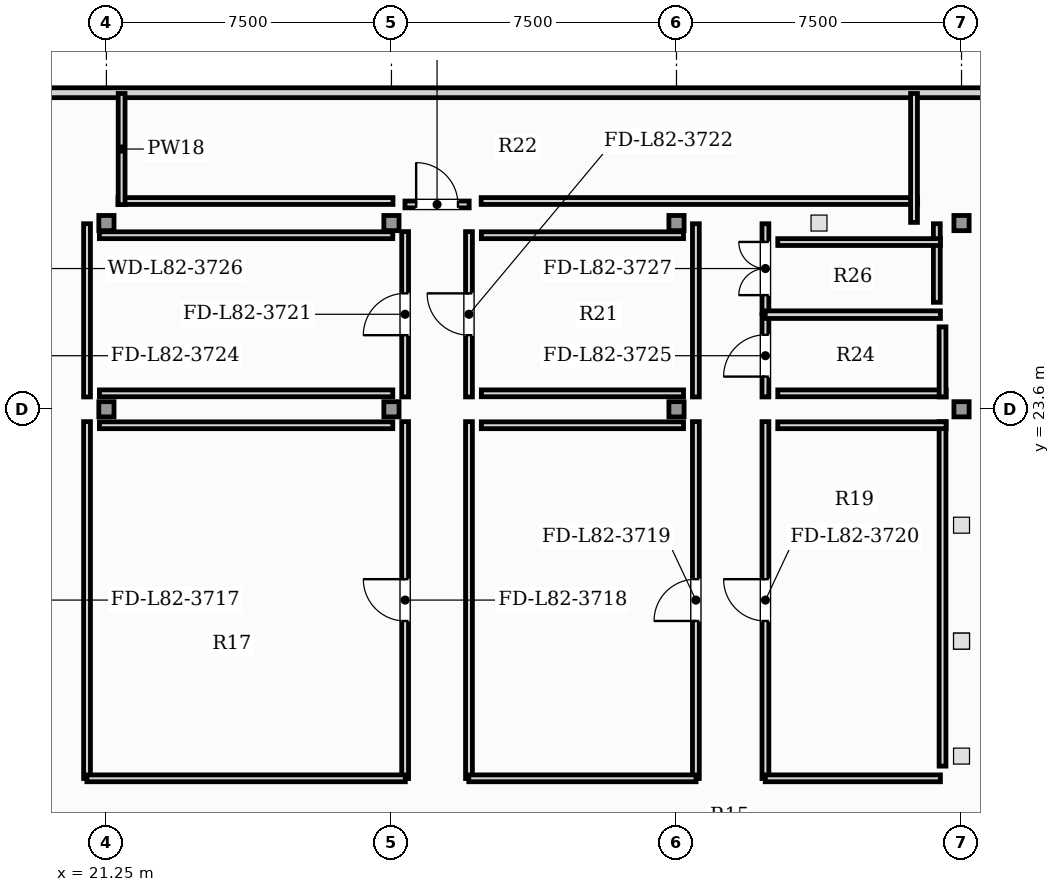
"""IFC4 building model, lengths in metres.
Left out: names, types, materials, properties, quantities, classifications, styles, units other than length and angle.
Written with IfcOpenShell. Run it as: python <this file> out.ifc"""

import sys

from ifc_helpers import new_model, si_unit, direction, frame, frame_2d, origin, origin_2d, place, context, subcontext, project, spatial, rectangle, hollow_rectangle, extrude, element, fill, save


model = new_model("IFC4")
c1 = context("Model", 3, precision=1e-05, world=origin(), true_north=direction((0.0, 1.0)))
c2 = subcontext(c1, "Body", "Model", "MODEL_VIEW")
j1 = project(units=[si_unit("LENGTHUNIT", "METRE"), si_unit("PLANEANGLEUNIT", "RADIAN")], contexts=[c1])
p1 = place(None, origin())
s1 = spatial("IfcSite", under=j1, at=p1, CompositionType="ELEMENT")
p2 = place(p1, origin())
s2 = spatial("IfcBuilding", under=s1, at=p2, CompositionType="ELEMENT")
p3 = place(p2, frame((0.0, 0.0, 332.3)))
s3 = spatial("IfcBuildingStorey", under=s2, at=p3, CompositionType="ELEMENT", Elevation=332.3)
p4 = place(p3, frame((21.25, 23.6, 0.0), z_axis=(0.0, 0.0, 1.0), x_axis=(1.0, 0.0, 0.0)))
e1 = element("IfcColumn", 1, at=p4, inside=s3, PredefinedType="COLUMN", context=c2, shape_type="SweptSolid", body=[
    extrude(hollow_rectangle(XDim=0.4, YDim=0.4, WallThickness=0.02, at=origin_2d()), origin(), (0.0, 0.0, 1.0), 5.2),
])
p5 = place(p3, frame((28.75, 23.6, 0.0), z_axis=(0.0, 0.0, 1.0), x_axis=(1.0, 0.0, 0.0)))
e2 = element("IfcColumn", 2, at=p5, inside=s3, PredefinedType="COLUMN", context=c2, shape_type="SweptSolid", body=[
    extrude(hollow_rectangle(XDim=0.4, YDim=0.4, WallThickness=0.02, at=origin_2d()), origin(), (0.0, 0.0, 1.0), 5.15),
])
for number, where, z_axis, x_axis in (
    (3, (36.25, 23.6, 0.0), (0.0, 0.0, 1.0), (1.0, 0.0, 0.0)),
    (4, (43.75, 23.6, 0.0), (0.0, 0.0, 1.0), (1.0, 0.0, 0.0)),
    (5, (21.25, 28.5, 0.0), (0.0, 0.0, 1.0), (1.0, 0.0, 0.0)),
):
    element("IfcColumn", number, at=place(p3, frame(where, z_axis=z_axis, x_axis=x_axis)), inside=s3, PredefinedType="COLUMN", context=c2, shape_type="SweptSolid", body=[
        extrude(hollow_rectangle(XDim=0.4, YDim=0.4, WallThickness=0.02, at=origin_2d()), origin(), (0.0, 0.0, 1.0), 5.2),
    ])
p6 = place(p3, frame((28.75, 28.5, 0.0), z_axis=(0.0, 0.0, 1.0), x_axis=(1.0, 0.0, 0.0)))
e6 = element("IfcColumn", 6, at=p6, inside=s3, PredefinedType="COLUMN", context=c2, shape_type="SweptSolid", body=[
    extrude(hollow_rectangle(XDim=0.4, YDim=0.4, WallThickness=0.02, at=origin_2d()), origin(), (0.0, 0.0, 1.0), 5.15),
])
for number, where, z_axis, x_axis in (
    (7, (36.25, 28.5, 0.0), (0.0, 0.0, 1.0), (1.0, 0.0, 0.0)),
    (8, (43.75, 28.5, 0.0), (0.0, 0.0, 1.0), (1.0, 0.0, 0.0)),
):
    element("IfcColumn", number, at=place(p3, frame(where, z_axis=z_axis, x_axis=x_axis)), inside=s3, PredefinedType="COLUMN", context=c2, shape_type="SweptSolid", body=[
        extrude(hollow_rectangle(XDim=0.4, YDim=0.4, WallThickness=0.02, at=origin_2d()), origin(), (0.0, 0.0, 1.0), 5.2),
    ])
p7 = place(p3, frame((44.983, 31.929, 0.0), z_axis=(0.0, 0.0, 1.0), x_axis=(-1.0, 0.0, 0.0)))
e9 = element("IfcWall", 9, at=p7, inside=s3, PredefinedType="SOLIDWALL", context=c2, shape_type="SweptSolid", body=[
    extrude(rectangle(XDim=32.465, YDim=0.26, at=frame_2d((16.233, 0.0))), origin(), (0.0, 0.0, 1.0), 4.98),
])
p8 = place(p3, frame((29.11, 13.885, 0.0), z_axis=(0.0, 0.0, 1.0), x_axis=(0.0, 1.0, 0.0)))
e10 = element("IfcWall", 10, at=p8, inside=s3, PredefinedType="PARTITIONING", context=c2, shape_type="SweptSolid", body=[
    extrude(rectangle(XDim=9.39, YDim=0.18, at=frame_2d((4.695, 0.0))), origin(), (0.0, 0.0, 1.0), 4.98),
])
p9 = place(p8, frame((4.145, 0.0, 0.0)))
e11 = element("IfcOpeningElement", 11, at=p9, cuts=e10, PredefinedType="OPENING", context=c2, shape_type="SweptSolid", body=[
    extrude(rectangle(XDim=1.1, YDim=2.2, at=frame_2d((0.55, 1.1))), frame((0.0, 0.1, 0.0), z_axis=(0.0, -1.0, 0.0), x_axis=(1.0, 0.0, 0.0)), (0.0, 0.0, 1.0), 0.2),
])
p10 = place(p3, frame((20.74, 13.885, 0.0), z_axis=(0.0, 0.0, 1.0), x_axis=(0.0, 1.0, 0.0)))
e12 = element("IfcWall", 12, at=p10, inside=s3, PredefinedType="PARTITIONING", context=c2, shape_type="SweptSolid", body=[
    extrude(rectangle(XDim=9.39, YDim=0.18, at=frame_2d((4.695, 0.0))), origin(), (0.0, 0.0, 1.0), 4.98),
])
p11 = place(p3, frame((20.735, 13.89, 0.0), z_axis=(0.0, 0.0, 1.0), x_axis=(1.0, 0.0, 0.0)))
e13 = element("IfcWall", 13, at=p11, inside=s3, PredefinedType="PARTITIONING", context=c2, shape_type="SweptSolid", body=[
    extrude(rectangle(XDim=8.38, YDim=0.18, at=frame_2d((4.19, 0.0))), origin(), (0.0, 0.0, 1.0), 4.98),
])
p12 = place(p3, frame((36.76, 13.885, 0.0), z_axis=(0.0, 0.0, 1.0), x_axis=(0.0, 1.0, 0.0)))
e14 = element("IfcWall", 14, at=p12, inside=s3, PredefinedType="PARTITIONING", context=c2, shape_type="SweptSolid", body=[
    extrude(rectangle(XDim=9.39, YDim=0.18, at=frame_2d((4.695, 0.0))), origin(), (0.0, 0.0, 1.0), 4.98),
])
p13 = place(p12, frame((4.145, 0.0, 0.0)))
e15 = element("IfcOpeningElement", 15, at=p13, cuts=e14, PredefinedType="OPENING", context=c2, shape_type="SweptSolid", body=[
    extrude(rectangle(XDim=1.1, YDim=2.2, at=frame_2d((0.55, 1.1))), frame((0.0, 0.1, 0.0), z_axis=(0.0, -1.0, 0.0), x_axis=(1.0, 0.0, 0.0)), (0.0, 0.0, 1.0), 0.2),
])
p14 = place(p3, frame((30.79, 13.885, 0.0), z_axis=(0.0, 0.0, 1.0), x_axis=(0.0, 1.0, 0.0)))
e16 = element("IfcWall", 16, at=p14, inside=s3, PredefinedType="PARTITIONING", context=c2, shape_type="SweptSolid", body=[
    extrude(rectangle(XDim=9.39, YDim=0.18, at=frame_2d((4.695, 0.0))), origin(), (0.0, 0.0, 1.0), 4.98),
])
p15 = place(p3, frame((30.785, 13.89, 0.0), z_axis=(0.0, 0.0, 1.0), x_axis=(1.0, 0.0, 0.0)))
e17 = element("IfcWall", 17, at=p15, inside=s3, PredefinedType="PARTITIONING", context=c2, shape_type="SweptSolid", body=[
    extrude(rectangle(XDim=5.98, YDim=0.18, at=frame_2d((2.99, 0.0))), origin(), (0.0, 0.0, 1.0), 4.98),
])
p16 = place(p3, frame((38.59, 13.885, 0.0), z_axis=(0.0, 0.0, 1.0), x_axis=(0.0, 1.0, 0.0)))
e18 = element("IfcWall", 18, at=p16, inside=s3, PredefinedType="PARTITIONING", context=c2, shape_type="SweptSolid", body=[
    extrude(rectangle(XDim=9.39, YDim=0.18, at=frame_2d((4.695, 0.0))), origin(), (0.0, 0.0, 1.0), 4.98),
])
p17 = place(p16, frame((4.145, 0.0, 0.0)))
e19 = element("IfcOpeningElement", 19, at=p17, cuts=e18, PredefinedType="OPENING", context=c2, shape_type="SweptSolid", body=[
    extrude(rectangle(XDim=1.1, YDim=2.2, at=frame_2d((0.55, 1.1))), frame((0.0, 0.1, 0.0), z_axis=(0.0, -1.0, 0.0), x_axis=(1.0, 0.0, 0.0)), (0.0, 0.0, 1.0), 0.2),
])
p18 = place(p3, frame((38.585, 13.89, 0.0), z_axis=(0.0, 0.0, 1.0), x_axis=(1.0, 0.0, 0.0)))
e20 = element("IfcWall", 20, at=p18, inside=s3, PredefinedType="PARTITIONING", context=c2, shape_type="SweptSolid", body=[
    extrude(rectangle(XDim=4.61, YDim=0.18, at=frame_2d((2.305, 0.0))), origin(), (0.0, 0.0, 1.0), 4.98),
])
p19 = place(p3, frame((29.11, 23.925, 0.0), z_axis=(0.0, 0.0, 1.0), x_axis=(0.0, 1.0, 0.0)))
e21 = element("IfcWall", 21, at=p19, inside=s3, PredefinedType="PARTITIONING", context=c2, shape_type="SweptSolid", body=[
    extrude(rectangle(XDim=4.35, YDim=0.18, at=frame_2d((2.175, 0.0))), origin(), (0.0, 0.0, 1.0), 4.98),
])
p20 = place(p19, frame((1.625, 0.0, 0.0)))
e22 = element("IfcOpeningElement", 22, at=p20, cuts=e21, PredefinedType="OPENING", context=c2, shape_type="SweptSolid", body=[
    extrude(rectangle(XDim=1.1, YDim=2.2, at=frame_2d((0.55, 1.1))), frame((0.0, 0.1, 0.0), z_axis=(0.0, -1.0, 0.0), x_axis=(1.0, 0.0, 0.0)), (0.0, 0.0, 1.0), 0.2),
])
p21 = place(p3, frame((20.74, 23.925, 0.0), z_axis=(0.0, 0.0, 1.0), x_axis=(0.0, 1.0, 0.0)))
e23 = element("IfcWall", 23, at=p21, inside=s3, PredefinedType="PARTITIONING", context=c2, shape_type="SweptSolid", body=[
    extrude(rectangle(XDim=4.557, YDim=0.18, at=frame_2d((2.278, 0.0))), origin(), (0.0, 0.0, 1.0), 4.98),
])
p22 = place(p3, frame((30.79, 23.925, 0.0), z_axis=(0.0, 0.0, 1.0), x_axis=(0.0, 1.0, 0.0)))
e24 = element("IfcWall", 24, at=p22, inside=s3, PredefinedType="PARTITIONING", context=c2, shape_type="SweptSolid", body=[
    extrude(rectangle(XDim=4.35, YDim=0.18, at=frame_2d((2.175, 0.0))), origin(), (0.0, 0.0, 1.0), 4.98),
])
p23 = place(p22, frame((1.625, 0.0, 0.0)))
e25 = element("IfcOpeningElement", 25, at=p23, cuts=e24, PredefinedType="OPENING", context=c2, shape_type="SweptSolid", body=[
    extrude(rectangle(XDim=1.1, YDim=2.2, at=frame_2d((0.55, 1.1))), frame((0.0, 0.1, 0.0), z_axis=(0.0, -1.0, 0.0), x_axis=(1.0, 0.0, 0.0)), (0.0, 0.0, 1.0), 0.2),
])
p24 = place(p3, frame((36.76, 23.925, 0.0), z_axis=(0.0, 0.0, 1.0), x_axis=(0.0, 1.0, 0.0)))
e26 = element("IfcWall", 26, at=p24, inside=s3, PredefinedType="PARTITIONING", context=c2, shape_type="SweptSolid", body=[
    extrude(rectangle(XDim=4.557, YDim=0.18, at=frame_2d((2.278, 0.0))), origin(), (0.0, 0.0, 1.0), 4.98),
])
p25 = place(p3, frame((29.105, 28.99, 0.0), z_axis=(0.0, 0.0, 1.0), x_axis=(1.0, 0.0, 0.0)))
e27 = element("IfcWall", 27, at=p25, inside=s3, PredefinedType="PARTITIONING", context=c2, shape_type="SweptSolid", body=[
    extrude(rectangle(XDim=1.69, YDim=0.18, at=frame_2d((0.845, 0.0))), origin(), (0.0, 0.0, 1.0), 4.98),
])
p26 = place(p25, frame((0.295, 0.0, 0.0)))
e28 = element("IfcOpeningElement", 28, at=p26, cuts=e27, PredefinedType="OPENING", context=c2, shape_type="SweptSolid", body=[
    extrude(rectangle(XDim=1.1, YDim=2.2, at=frame_2d((0.55, 1.1))), frame((0.0, 0.1, 0.0), z_axis=(0.0, -1.0, 0.0), x_axis=(1.0, 0.0, 0.0)), (0.0, 0.0, 1.0), 0.2),
])
p27 = place(p3, frame((38.59, 23.925, 0.0), z_axis=(0.0, 0.0, 1.0), x_axis=(0.0, 1.0, 0.0)))
e29 = element("IfcWall", 29, at=p27, inside=s3, PredefinedType="PARTITIONING", context=c2, shape_type="SweptSolid", body=[
    extrude(rectangle(XDim=2.17, YDim=0.18, at=frame_2d((1.085, 0.0))), origin(), (0.0, 0.0, 1.0), 4.98),
])
p28 = place(p27, frame((0.535, 0.0, 0.0)))
e30 = element("IfcOpeningElement", 30, at=p28, cuts=e29, PredefinedType="OPENING", context=c2, shape_type="SweptSolid", body=[
    extrude(rectangle(XDim=1.1, YDim=2.2, at=frame_2d((0.55, 1.1))), frame((0.0, 0.1, 0.0), z_axis=(0.0, -1.0, 0.0), x_axis=(1.0, 0.0, 0.0)), (0.0, 0.0, 1.0), 0.2),
])
p29 = place(p3, frame((38.59, 26.125, 0.0), z_axis=(0.0, 0.0, 1.0), x_axis=(0.0, 1.0, 0.0)))
e31 = element("IfcWall", 31, at=p29, inside=s3, PredefinedType="PARTITIONING", context=c2, shape_type="SweptSolid", body=[
    extrude(rectangle(XDim=2.357, YDim=0.18, at=frame_2d((1.178, 0.0))), origin(), (0.0, 0.0, 1.0), 4.98),
])
p30 = place(p29, frame((0.479, 0.0, 0.0)))
e32 = element("IfcOpeningElement", 32, at=p30, cuts=e31, PredefinedType="OPENING", context=c2, shape_type="SweptSolid", body=[
    extrude(rectangle(XDim=1.4, YDim=2.2, at=frame_2d((0.7, 1.1))), frame((0.0, 0.1, 0.0), z_axis=(0.0, -1.0, 0.0), x_axis=(1.0, 0.0, 0.0)), (0.0, 0.0, 1.0), 0.2),
])
p31 = place(p3, frame((38.585, 26.09, 0.0), z_axis=(0.0, 0.0, 1.0), x_axis=(1.0, 0.0, 0.0)))
e33 = element("IfcWall", 33, at=p31, inside=s3, PredefinedType="PARTITIONING", context=c2, shape_type="SweptSolid", body=[
    extrude(rectangle(XDim=4.61, YDim=0.2, at=frame_2d((2.305, 0.0))), origin(), (0.0, 0.0, 1.0), 4.98),
])
p32 = place(p3, frame((28.785, 23.18, 0.0), z_axis=(0.0, 0.0, 1.0), x_axis=(-1.0, 0.0, 0.0)))
e34 = element("IfcWall", 34, at=p32, inside=s3, PredefinedType="PARTITIONING", context=c2, shape_type="SweptSolid", body=[
    extrude(rectangle(XDim=7.72, YDim=0.18, at=frame_2d((3.86, 0.0))), origin(), (0.0, 0.0, 1.0), 4.98),
])
p33 = place(p3, frame((36.435, 23.18, 0.0), z_axis=(0.0, 0.0, 1.0), x_axis=(-1.0, 0.0, 0.0)))
e35 = element("IfcWall", 35, at=p33, inside=s3, PredefinedType="PARTITIONING", context=c2, shape_type="SweptSolid", body=[
    extrude(rectangle(XDim=5.32, YDim=0.18, at=frame_2d((2.66, 0.0))), origin(), (0.0, 0.0, 1.0), 4.98),
])
p34 = place(p3, frame((43.25, 14.211, 0.0), z_axis=(0.0, 0.0, 1.0), x_axis=(0.0, 1.0, 0.0)))
e36 = element("IfcWall", 36, at=p34, inside=s3, PredefinedType="PARTITIONING", context=c2, shape_type="SweptSolid", body=[
    extrude(rectangle(XDim=9.064, YDim=0.18, at=frame_2d((4.532, 0.0))), origin(), (0.0, 0.0, 1.0), 4.98),
])
p35 = place(p3, frame((43.345, 23.18, 0.0), z_axis=(0.0, 0.0, 1.0), x_axis=(-1.0, 0.0, 0.0)))
e37 = element("IfcWall", 37, at=p35, inside=s3, PredefinedType="PARTITIONING", context=c2, shape_type="SweptSolid", body=[
    extrude(rectangle(XDim=4.43, YDim=0.18, at=frame_2d((2.215, 0.0))), origin(), (0.0, 0.0, 1.0), 4.98),
])
for number, where, z_axis, x_axis in (
    (38, (21.065, 24.02, 0.0), (0.0, 0.0, 1.0), (1.0, 0.0, 0.0)),
    (39, (28.785, 28.18, 0.0), (0.0, 0.0, 1.0), (-1.0, 0.0, 0.0)),
):
    element("IfcWall", number, at=place(p3, frame(where, z_axis=z_axis, x_axis=x_axis)), inside=s3, PredefinedType="PARTITIONING", context=c2, shape_type="SweptSolid", body=[
        extrude(rectangle(XDim=7.72, YDim=0.18, at=frame_2d((3.86, 0.0))), origin(), (0.0, 0.0, 1.0), 4.98),
    ])
for number, where, z_axis, x_axis in (
    (40, (31.115, 24.02, 0.0), (0.0, 0.0, 1.0), (1.0, 0.0, 0.0)),
    (41, (36.435, 28.18, 0.0), (0.0, 0.0, 1.0), (-1.0, 0.0, 0.0)),
):
    element("IfcWall", number, at=place(p3, frame(where, z_axis=z_axis, x_axis=x_axis)), inside=s3, PredefinedType="PARTITIONING", context=c2, shape_type="SweptSolid", body=[
        extrude(rectangle(XDim=5.32, YDim=0.18, at=frame_2d((2.66, 0.0))), origin(), (0.0, 0.0, 1.0), 4.98),
    ])
p36 = place(p3, frame((21.555, 29.08, 0.0), z_axis=(0.0, 0.0, 1.0), x_axis=(1.0, 0.0, 0.0)))
e42 = element("IfcWall", 42, at=p36, inside=s3, PredefinedType="PARTITIONING", context=c2, shape_type="SweptSolid", body=[
    extrude(rectangle(XDim=7.235, YDim=0.18, at=frame_2d((3.618, 0.0))), origin(), (0.0, 0.0, 1.0), 4.98),
])
p37 = place(p3, frame((31.11, 29.08, 0.0), z_axis=(0.0, 0.0, 1.0), x_axis=(1.0, 0.0, 0.0)))
e43 = element("IfcWall", 43, at=p37, inside=s3, PredefinedType="PARTITIONING", context=c2, shape_type="SweptSolid", body=[
    extrude(rectangle(XDim=11.485, YDim=0.18, at=frame_2d((5.743, 0.0))), origin(), (0.0, 0.0, 1.0), 4.98),
])
p38 = place(p3, frame((42.5, 28.518, 0.0), z_axis=(0.0, 0.0, 1.0), x_axis=(0.0, 1.0, 0.0)))
e44 = element("IfcWall", 44, at=p38, inside=s3, PredefinedType="PARTITIONING", context=c2, shape_type="SweptSolid", body=[
    extrude(rectangle(XDim=3.392, YDim=0.18, at=frame_2d((1.696, 0.0))), origin(), (0.0, 0.0, 1.0), 4.98),
])
p39 = place(p3, frame((21.65, 31.91, 0.0), z_axis=(0.0, 0.0, 1.0), x_axis=(0.0, -1.0, 0.0)))
e45 = element("IfcWall", 45, at=p39, inside=s3, PredefinedType="PARTITIONING", context=c2, shape_type="SweptSolid", body=[
    extrude(rectangle(XDim=2.925, YDim=0.18, at=frame_2d((1.462, 0.0))), origin(), (0.0, 0.0, 1.0), 4.98),
])
p40 = place(p3, frame((38.915, 24.02, 0.0), z_axis=(0.0, 0.0, 1.0), x_axis=(1.0, 0.0, 0.0)))
e46 = element("IfcWall", 46, at=p40, inside=s3, PredefinedType="PARTITIONING", context=c2, shape_type="SweptSolid", body=[
    extrude(rectangle(XDim=4.43, YDim=0.18, at=frame_2d((2.215, 0.0))), origin(), (0.0, 0.0, 1.0), 4.98),
])
p41 = place(p3, frame((43.25, 23.925, 0.0), z_axis=(0.0, 0.0, 1.0), x_axis=(0.0, 1.0, 0.0)))
e47 = element("IfcWall", 47, at=p41, inside=s3, PredefinedType="PARTITIONING", context=c2, shape_type="SweptSolid", body=[
    extrude(rectangle(XDim=1.844, YDim=0.18, at=frame_2d((0.922, 0.0))), origin(), (0.0, 0.0, 1.0), 4.98),
])
p42 = place(p3, frame((43.1, 26.415, 0.0), z_axis=(0.0, 0.0, 1.0), x_axis=(0.0, 1.0, 0.0)))
e48 = element("IfcWall", 48, at=p42, inside=s3, PredefinedType="PARTITIONING", context=c2, shape_type="SweptSolid", body=[
    extrude(rectangle(XDim=2.067, YDim=0.18, at=frame_2d((1.033, 0.0))), origin(), (0.0, 0.0, 1.0), 4.98),
])
p43 = place(p3, frame((43.195, 28.0, 0.0), z_axis=(0.0, 0.0, 1.0), x_axis=(-1.0, 0.0, 0.0)))
e49 = element("IfcWall", 49, at=p43, inside=s3, PredefinedType="PARTITIONING", context=c2, shape_type="SweptSolid", body=[
    extrude(rectangle(XDim=4.28, YDim=0.18, at=frame_2d((2.14, 0.0))), origin(), (0.0, 0.0, 1.0), 4.98),
])
p44 = place(p9, origin())
e50 = element("IfcDoor", 50, at=p44, inside=s3, OperationType="SINGLE_SWING_RIGHT", PredefinedType="DOOR", context=c2, shape_type="SweptSolid", body=[
    extrude(rectangle(XDim=1.1, YDim=2.2, at=frame_2d((0.55, 1.1))), frame((0.0, 0.025, 0.0), z_axis=(0.0, -1.0, 0.0), x_axis=(1.0, 0.0, 0.0)), (0.0, 0.0, 1.0), 0.05),
])
fill(e11, e50)
p45 = place(p13, origin())
e51 = element("IfcDoor", 51, at=p45, inside=s3, OperationType="SINGLE_SWING_LEFT", PredefinedType="DOOR", context=c2, shape_type="SweptSolid", body=[
    extrude(rectangle(XDim=1.1, YDim=2.2, at=frame_2d((0.55, 1.1))), frame((0.0, 0.025, 0.0), z_axis=(0.0, -1.0, 0.0), x_axis=(1.0, 0.0, 0.0)), (0.0, 0.0, 1.0), 0.05),
])
fill(e15, e51)
p46 = place(p17, origin())
e52 = element("IfcDoor", 52, at=p46, inside=s3, OperationType="SINGLE_SWING_RIGHT", PredefinedType="DOOR", context=c2, shape_type="SweptSolid", body=[
    extrude(rectangle(XDim=1.1, YDim=2.2, at=frame_2d((0.55, 1.1))), frame((0.0, 0.025, 0.0), z_axis=(0.0, -1.0, 0.0), x_axis=(1.0, 0.0, 0.0)), (0.0, 0.0, 1.0), 0.05),
])
fill(e19, e52)
p47 = place(p20, origin())
e53 = element("IfcDoor", 53, at=p47, inside=s3, OperationType="SINGLE_SWING_LEFT", PredefinedType="DOOR", context=c2, shape_type="SweptSolid", body=[
    extrude(rectangle(XDim=1.1, YDim=2.2, at=frame_2d((0.55, 1.1))), frame((0.0, 0.025, 0.0), z_axis=(0.0, -1.0, 0.0), x_axis=(1.0, 0.0, 0.0)), (0.0, 0.0, 1.0), 0.05),
])
fill(e22, e53)
p48 = place(p23, origin())
e54 = element("IfcDoor", 54, at=p48, inside=s3, OperationType="SINGLE_SWING_RIGHT", PredefinedType="DOOR", context=c2, shape_type="SweptSolid", body=[
    extrude(rectangle(XDim=1.1, YDim=2.2, at=frame_2d((0.55, 1.1))), frame((0.0, 0.025, 0.0), z_axis=(0.0, -1.0, 0.0), x_axis=(1.0, 0.0, 0.0)), (0.0, 0.0, 1.0), 0.05),
])
fill(e25, e54)
p49 = place(p26, origin())
e55 = element("IfcDoor", 55, at=p49, inside=s3, OperationType="SINGLE_SWING_LEFT", PredefinedType="DOOR", context=c2, shape_type="SweptSolid", body=[
    extrude(rectangle(XDim=1.1, YDim=2.2, at=frame_2d((0.55, 1.1))), frame((0.0, 0.025, 0.0), z_axis=(0.0, -1.0, 0.0), x_axis=(1.0, 0.0, 0.0)), (0.0, 0.0, 1.0), 0.05),
])
fill(e28, e55)
p50 = place(p28, origin())
e56 = element("IfcDoor", 56, at=p50, inside=s3, OperationType="SINGLE_SWING_LEFT", PredefinedType="DOOR", context=c2, shape_type="SweptSolid", body=[
    extrude(rectangle(XDim=1.1, YDim=2.2, at=frame_2d((0.55, 1.1))), frame((0.0, 0.025, 0.0), z_axis=(0.0, -1.0, 0.0), x_axis=(1.0, 0.0, 0.0)), (0.0, 0.0, 1.0), 0.05),
])
fill(e30, e56)
p51 = place(p30, origin())
e57 = element("IfcDoor", 57, at=p51, inside=s3, OperationType="DOUBLE_DOOR_SINGLE_SWING", PredefinedType="DOOR", context=c2, shape_type="SweptSolid", body=[
    extrude(rectangle(XDim=1.4, YDim=2.2, at=frame_2d((0.7, 1.1))), frame((0.0, 0.025, 0.0), z_axis=(0.0, -1.0, 0.0), x_axis=(1.0, 0.0, 0.0)), (0.0, 0.0, 1.0), 0.05),
])
fill(e32, e57)
save(model, sys.argv[1])
